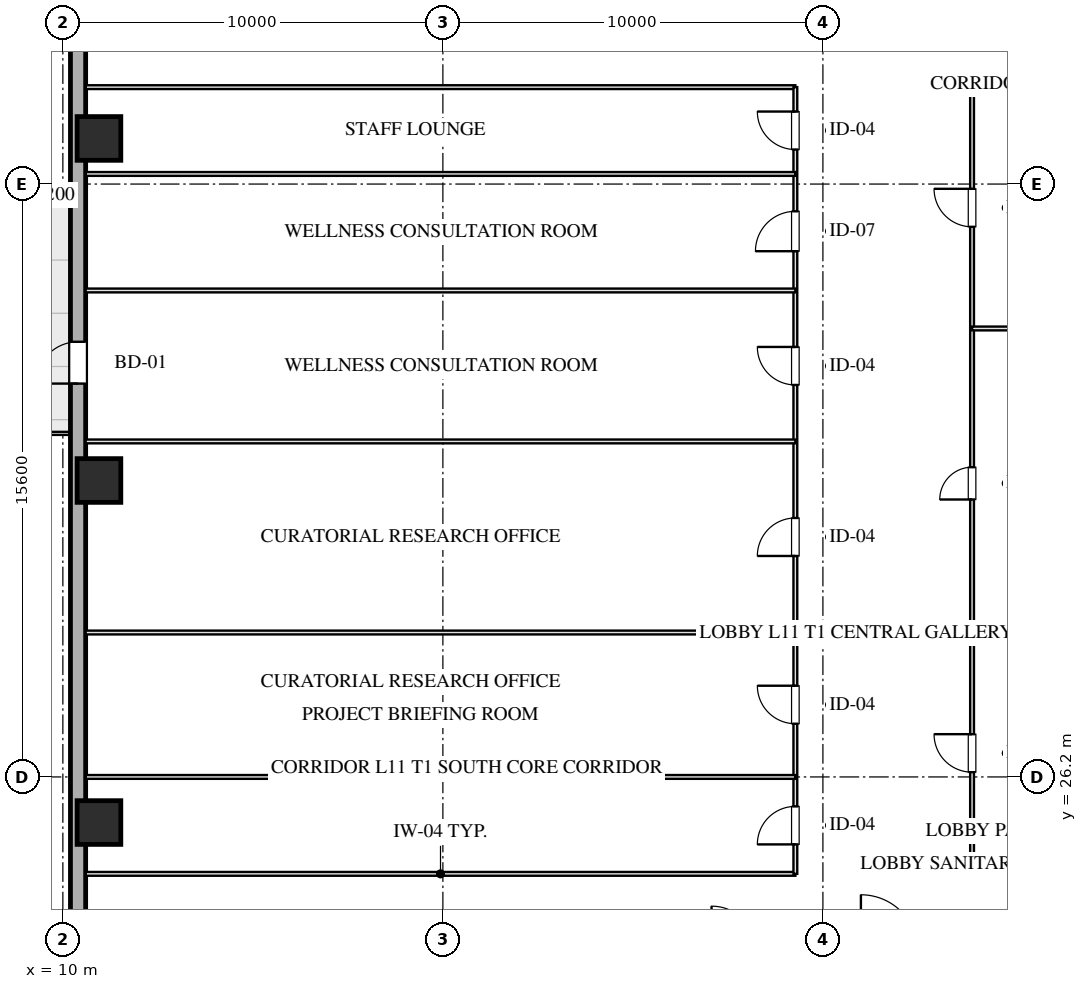
"""IFC4 building model, lengths in metres.
Left out: names, types, materials, properties, quantities, classifications, styles, units other than length and angle.
Written with IfcOpenShell. Run it as: python <this file> out.ifc"""

import sys

from ifc_helpers import new_model, si_unit, direction, frame, frame_2d, origin, origin_2d, place, context, subcontext, project, spatial, rectangle, hollow_rectangle, extrude, element, fill, save


model = new_model("IFC4")
c1 = context("Model", 3, precision=1e-05, world=origin(), true_north=direction((0.0, 1.0)))
c2 = subcontext(c1, "Body", "Model", "MODEL_VIEW")
j1 = project(units=[si_unit("LENGTHUNIT", "METRE"), si_unit("PLANEANGLEUNIT", "RADIAN")], contexts=[c1])
p1 = place(None, origin())
s1 = spatial("IfcSite", under=j1, at=p1, CompositionType="ELEMENT")
p2 = place(p1, origin())
s2 = spatial("IfcBuilding", under=s1, at=p2, CompositionType="ELEMENT")
p3 = place(p2, frame((0.0, 0.0, 50.6)))
s3 = spatial("IfcBuildingStorey", under=s2, at=p3, CompositionType="ELEMENT", Elevation=50.6)
for number, where, z_axis, x_axis in (
    (1, (10.95, 25.0, 0.0), (0.0, 0.0, 1.0), (1.0, 0.0, 0.0)),
    (2, (10.95, 34.0, 0.0), (0.0, 0.0, 1.0), (1.0, 0.0, 0.0)),
    (3, (10.95, 43.0, 0.0), (0.0, 0.0, 1.0), (1.0, 0.0, 0.0)),
):
    element("IfcColumn", number, at=place(p3, frame(where, z_axis=z_axis, x_axis=x_axis)), inside=s3, PredefinedType="COLUMN", context=c2, shape_type="SweptSolid", body=[
        extrude(hollow_rectangle(XDim=1.15, YDim=1.15, WallThickness=0.04, at=origin_2d()), origin(), (0.0, 0.0, 1.0), 3.451),
    ])
p4 = place(p3, frame((10.4, 7.2, 0.0), z_axis=(0.0, 0.0, 1.0), x_axis=(0.0, 1.0, 0.0)))
e4 = element("IfcWall", 4, at=p4, inside=s3, PredefinedType="SOLIDWALL", context=c2, shape_type="SweptSolid", body=[
    extrude(rectangle(XDim=53.6, YDim=0.4, at=frame_2d((26.8, 0.0))), origin(), (0.0, 0.0, 1.0), 2.61),
])
p5 = place(p4, frame((29.35, 0.0, 0.0)))
e5 = element("IfcOpeningElement", 5, at=p5, cuts=e4, PredefinedType="OPENING", context=c2, shape_type="SweptSolid", body=[
    extrude(rectangle(XDim=1.1, YDim=2.15, at=frame_2d((0.55, 1.075))), frame((0.0, 0.21, 0.0), z_axis=(0.0, -1.0, 0.0), x_axis=(1.0, 0.0, 0.0)), (0.0, 0.0, 1.0), 0.42),
])
p6 = place(p3, frame((10.6, 23.65, 0.0), z_axis=(0.0, 0.0, 1.0), x_axis=(1.0, 0.0, 0.0)))
e6 = element("IfcWall", 6, at=p6, inside=s3, PredefinedType="MOVABLE", context=c2, shape_type="SweptSolid", body=[
    extrude(rectangle(XDim=18.675, YDim=0.1, at=frame_2d((9.337, 0.0))), origin(), (0.0, 0.0, 1.0), 3.175),
])
p7 = place(p3, frame((33.925, 23.65, 0.0), z_axis=(0.0, 0.0, 1.0), x_axis=(1.0, 0.0, 0.0)))
e7 = element("IfcWall", 7, at=p7, inside=s3, PredefinedType="MOVABLE", context=c2, shape_type="SweptSolid", body=[
    extrude(rectangle(XDim=15.475, YDim=0.1, at=frame_2d((7.737, 0.0))), origin(), (0.0, 0.0, 1.0), 3.175),
])
p8 = place(p3, frame((10.6, 44.35, 0.0), z_axis=(0.0, 0.0, 1.0), x_axis=(1.0, 0.0, 0.0)))
e8 = element("IfcWall", 8, at=p8, inside=s3, PredefinedType="MOVABLE", context=c2, shape_type="SweptSolid", body=[
    extrude(rectangle(XDim=18.675, YDim=0.1, at=frame_2d((9.337, 0.0))), origin(), (0.0, 0.0, 1.0), 3.175),
])
p9 = place(p3, frame((33.925, 44.35, 0.0), z_axis=(0.0, 0.0, 1.0), x_axis=(1.0, 0.0, 0.0)))
e9 = element("IfcWall", 9, at=p9, inside=s3, PredefinedType="MOVABLE", context=c2, shape_type="SweptSolid", body=[
    extrude(rectangle(XDim=15.475, YDim=0.1, at=frame_2d((7.737, 0.0))), origin(), (0.0, 0.0, 1.0), 3.175),
])
p10 = place(p3, frame((29.275, 23.65, 0.0), z_axis=(0.0, 0.0, 1.0), x_axis=(0.0, 1.0, 0.0)))
e10 = element("IfcWall", 10, at=p10, inside=s3, PredefinedType="MOVABLE", context=c2, shape_type="SweptSolid", body=[
    extrude(rectangle(XDim=20.7, YDim=0.1, at=frame_2d((10.35, 0.0))), origin(), (0.0, 0.0, 1.0), 3.175),
])
p11 = place(p10, frame((0.775, 0.0, 0.0)))
e11 = element("IfcOpeningElement", 11, at=p11, cuts=e10, PredefinedType="OPENING", context=c2, shape_type="SweptSolid", body=[
    extrude(rectangle(XDim=1.0, YDim=2.05, at=frame_2d((0.5, 1.025))), frame((0.0, 0.06, 0.0), z_axis=(0.0, -1.0, 0.0), x_axis=(1.0, 0.0, 0.0)), (0.0, 0.0, 1.0), 0.12),
])
p12 = place(p10, frame((3.95, 0.0, 0.0)))
e12 = element("IfcOpeningElement", 12, at=p12, cuts=e10, PredefinedType="OPENING", context=c2, shape_type="SweptSolid", body=[
    extrude(rectangle(XDim=1.0, YDim=2.05, at=frame_2d((0.5, 1.025))), frame((0.0, 0.06, 0.0), z_axis=(0.0, -1.0, 0.0), x_axis=(1.0, 0.0, 0.0)), (0.0, 0.0, 1.0), 0.12),
])
p13 = place(p10, frame((8.364, 0.0, 0.0)))
e13 = element("IfcOpeningElement", 13, at=p13, cuts=e10, PredefinedType="OPENING", context=c2, shape_type="SweptSolid", body=[
    extrude(rectangle(XDim=1.0, YDim=2.05, at=frame_2d((0.5, 1.025))), frame((0.0, 0.06, 0.0), z_axis=(0.0, -1.0, 0.0), x_axis=(1.0, 0.0, 0.0)), (0.0, 0.0, 1.0), 0.12),
])
p14 = place(p10, frame((12.864, 0.0, 0.0)))
e14 = element("IfcOpeningElement", 14, at=p14, cuts=e10, PredefinedType="OPENING", context=c2, shape_type="SweptSolid", body=[
    extrude(rectangle(XDim=1.0, YDim=2.05, at=frame_2d((0.5, 1.025))), frame((0.0, 0.06, 0.0), z_axis=(0.0, -1.0, 0.0), x_axis=(1.0, 0.0, 0.0)), (0.0, 0.0, 1.0), 0.12),
])
p15 = place(p10, frame((16.383, 0.0, 0.0)))
e15 = element("IfcOpeningElement", 15, at=p15, cuts=e10, PredefinedType="OPENING", context=c2, shape_type="SweptSolid", body=[
    extrude(rectangle(XDim=1.05, YDim=2.05, at=frame_2d((0.525, 1.025))), frame((0.0, 0.06, 0.0), z_axis=(0.0, -1.0, 0.0), x_axis=(1.0, 0.0, 0.0)), (0.0, 0.0, 1.0), 0.12),
])
p16 = place(p10, frame((19.058, 0.0, 0.0)))
e16 = element("IfcOpeningElement", 16, at=p16, cuts=e10, PredefinedType="OPENING", context=c2, shape_type="SweptSolid", body=[
    extrude(rectangle(XDim=1.0, YDim=2.05, at=frame_2d((0.5, 1.025))), frame((0.0, 0.06, 0.0), z_axis=(0.0, -1.0, 0.0), x_axis=(1.0, 0.0, 0.0)), (0.0, 0.0, 1.0), 0.12),
])
p17 = place(p3, frame((33.925, 23.65, 0.0), z_axis=(0.0, 0.0, 1.0), x_axis=(0.0, 1.0, 0.0)))
e17 = element("IfcWall", 17, at=p17, inside=s3, PredefinedType="MOVABLE", context=c2, shape_type="SweptSolid", body=[
    extrude(rectangle(XDim=20.7, YDim=0.1, at=frame_2d((10.35, 0.0))), origin(), (0.0, 0.0, 1.0), 3.175),
])
p18 = place(p17, frame((2.675, 0.0, 0.0)))
e18 = element("IfcOpeningElement", 18, at=p18, cuts=e17, PredefinedType="OPENING", context=c2, shape_type="SweptSolid", body=[
    extrude(rectangle(XDim=1.0, YDim=2.05, at=frame_2d((0.5, 1.025))), frame((0.0, 0.06, 0.0), z_axis=(0.0, -1.0, 0.0), x_axis=(1.0, 0.0, 0.0)), (0.0, 0.0, 1.0), 0.12),
])
p19 = place(p17, frame((9.85, 0.0, 0.0)))
e19 = element("IfcOpeningElement", 19, at=p19, cuts=e17, PredefinedType="OPENING", context=c2, shape_type="SweptSolid", body=[
    extrude(rectangle(XDim=0.85, YDim=2.05, at=frame_2d((0.425, 1.025))), frame((0.0, 0.06, 0.0), z_axis=(0.0, -1.0, 0.0), x_axis=(1.0, 0.0, 0.0)), (0.0, 0.0, 1.0), 0.12),
])
p20 = place(p17, frame((17.025, 0.0, 0.0)))
e20 = element("IfcOpeningElement", 20, at=p20, cuts=e17, PredefinedType="OPENING", context=c2, shape_type="SweptSolid", body=[
    extrude(rectangle(XDim=1.0, YDim=2.05, at=frame_2d((0.5, 1.025))), frame((0.0, 0.06, 0.0), z_axis=(0.0, -1.0, 0.0), x_axis=(1.0, 0.0, 0.0)), (0.0, 0.0, 1.0), 0.12),
])
for number, where, z_axis, x_axis in (
    (21, (10.6, 26.2, 0.0), (0.0, 0.0, 1.0), (1.0, 0.0, 0.0)),
    (22, (10.6, 30.0, 0.0), (0.0, 0.0, 1.0), (1.0, 0.0, 0.0)),
    (23, (10.6, 35.028, 0.0), (0.0, 0.0, 1.0), (1.0, 0.0, 0.0)),
    (24, (10.6, 39.0, 0.0), (0.0, 0.0, 1.0), (1.0, 0.0, 0.0)),
    (25, (10.6, 42.066, 0.0), (0.0, 0.0, 1.0), (1.0, 0.0, 0.0)),
):
    element("IfcWall", number, at=place(p3, frame(where, z_axis=z_axis, x_axis=x_axis)), inside=s3, PredefinedType="MOVABLE", context=c2, shape_type="SweptSolid", body=[
        extrude(rectangle(XDim=18.675, YDim=0.1, at=frame_2d((9.337, 0.0))), origin(), (0.0, 0.0, 1.0), 3.175),
    ])
for number, where, z_axis, x_axis in (
    (26, (33.925, 30.0, 0.0), (0.0, 0.0, 1.0), (1.0, 0.0, 0.0)),
    (27, (33.925, 38.0, 0.0), (0.0, 0.0, 1.0), (1.0, 0.0, 0.0)),
):
    element("IfcWall", number, at=place(p3, frame(where, z_axis=z_axis, x_axis=x_axis)), inside=s3, PredefinedType="MOVABLE", context=c2, shape_type="SweptSolid", body=[
        extrude(rectangle(XDim=15.475, YDim=0.1, at=frame_2d((7.737, 0.0))), origin(), (0.0, 0.0, 1.0), 3.175),
    ])
p21 = place(p5, origin())
e28 = element("IfcDoor", 28, at=p21, inside=s3, OperationType="SINGLE_SWING_LEFT", PredefinedType="DOOR", context=c2, shape_type="SweptSolid", body=[
    extrude(rectangle(XDim=1.1, YDim=2.15, at=frame_2d((0.55, 1.075))), frame((0.0, 0.025, 0.0), z_axis=(0.0, -1.0, 0.0), x_axis=(1.0, 0.0, 0.0)), (0.0, 0.0, 1.0), 0.05),
])
fill(e5, e28)
p22 = place(p11, origin())
e29 = element("IfcDoor", 29, at=p22, inside=s3, OperationType="SINGLE_SWING_LEFT", PredefinedType="DOOR", context=c2, shape_type="SweptSolid", body=[
    extrude(rectangle(XDim=1.0, YDim=2.05, at=frame_2d((0.5, 1.025))), frame((0.0, 0.025, 0.0), z_axis=(0.0, -1.0, 0.0), x_axis=(1.0, 0.0, 0.0)), (0.0, 0.0, 1.0), 0.05),
])
fill(e11, e29)
p23 = place(p12, origin())
e30 = element("IfcDoor", 30, at=p23, inside=s3, OperationType="SINGLE_SWING_RIGHT", PredefinedType="DOOR", context=c2, shape_type="SweptSolid", body=[
    extrude(rectangle(XDim=1.0, YDim=2.05, at=frame_2d((0.5, 1.025))), frame((0.0, 0.025, 0.0), z_axis=(0.0, -1.0, 0.0), x_axis=(1.0, 0.0, 0.0)), (0.0, 0.0, 1.0), 0.05),
])
fill(e12, e30)
p24 = place(p13, origin())
e31 = element("IfcDoor", 31, at=p24, inside=s3, OperationType="SINGLE_SWING_LEFT", PredefinedType="DOOR", context=c2, shape_type="SweptSolid", body=[
    extrude(rectangle(XDim=1.0, YDim=2.05, at=frame_2d((0.5, 1.025))), frame((0.0, 0.025, 0.0), z_axis=(0.0, -1.0, 0.0), x_axis=(1.0, 0.0, 0.0)), (0.0, 0.0, 1.0), 0.05),
])
fill(e13, e31)
p25 = place(p14, origin())
e32 = element("IfcDoor", 32, at=p25, inside=s3, OperationType="SINGLE_SWING_RIGHT", PredefinedType="DOOR", context=c2, shape_type="SweptSolid", body=[
    extrude(rectangle(XDim=1.0, YDim=2.05, at=frame_2d((0.5, 1.025))), frame((0.0, 0.025, 0.0), z_axis=(0.0, -1.0, 0.0), x_axis=(1.0, 0.0, 0.0)), (0.0, 0.0, 1.0), 0.05),
])
fill(e14, e32)
p26 = place(p15, origin())
e33 = element("IfcDoor", 33, at=p26, inside=s3, OperationType="SINGLE_SWING_LEFT", PredefinedType="DOOR", context=c2, shape_type="SweptSolid", body=[
    extrude(rectangle(XDim=1.05, YDim=2.05, at=frame_2d((0.525, 1.025))), frame((0.0, 0.025, 0.0), z_axis=(0.0, -1.0, 0.0), x_axis=(1.0, 0.0, 0.0)), (0.0, 0.0, 1.0), 0.05),
])
fill(e15, e33)
p27 = place(p16, origin())
e34 = element("IfcDoor", 34, at=p27, inside=s3, OperationType="SINGLE_SWING_RIGHT", PredefinedType="DOOR", context=c2, shape_type="SweptSolid", body=[
    extrude(rectangle(XDim=1.0, YDim=2.05, at=frame_2d((0.5, 1.025))), frame((0.0, 0.025, 0.0), z_axis=(0.0, -1.0, 0.0), x_axis=(1.0, 0.0, 0.0)), (0.0, 0.0, 1.0), 0.05),
])
fill(e16, e34)
p28 = place(p18, origin())
e35 = element("IfcDoor", 35, at=p28, inside=s3, OperationType="SINGLE_SWING_RIGHT", PredefinedType="DOOR", context=c2, shape_type="SweptSolid", body=[
    extrude(rectangle(XDim=1.0, YDim=2.05, at=frame_2d((0.5, 1.025))), frame((0.0, 0.025, 0.0), z_axis=(0.0, -1.0, 0.0), x_axis=(1.0, 0.0, 0.0)), (0.0, 0.0, 1.0), 0.05),
])
fill(e18, e35)
p29 = place(p19, origin())
e36 = element("IfcDoor", 36, at=p29, inside=s3, OperationType="SINGLE_SWING_LEFT", PredefinedType="DOOR", context=c2, shape_type="SweptSolid", body=[
    extrude(rectangle(XDim=0.85, YDim=2.05, at=frame_2d((0.425, 1.025))), frame((0.0, 0.025, 0.0), z_axis=(0.0, -1.0, 0.0), x_axis=(1.0, 0.0, 0.0)), (0.0, 0.0, 1.0), 0.05),
])
fill(e19, e36)
p30 = place(p20, origin())
e37 = element("IfcDoor", 37, at=p30, inside=s3, OperationType="SINGLE_SWING_RIGHT", PredefinedType="DOOR", context=c2, shape_type="SweptSolid", body=[
    extrude(rectangle(XDim=1.0, YDim=2.05, at=frame_2d((0.5, 1.025))), frame((0.0, 0.025, 0.0), z_axis=(0.0, -1.0, 0.0), x_axis=(1.0, 0.0, 0.0)), (0.0, 0.0, 1.0), 0.05),
])
fill(e20, e37)
save(model, sys.argv[1])
